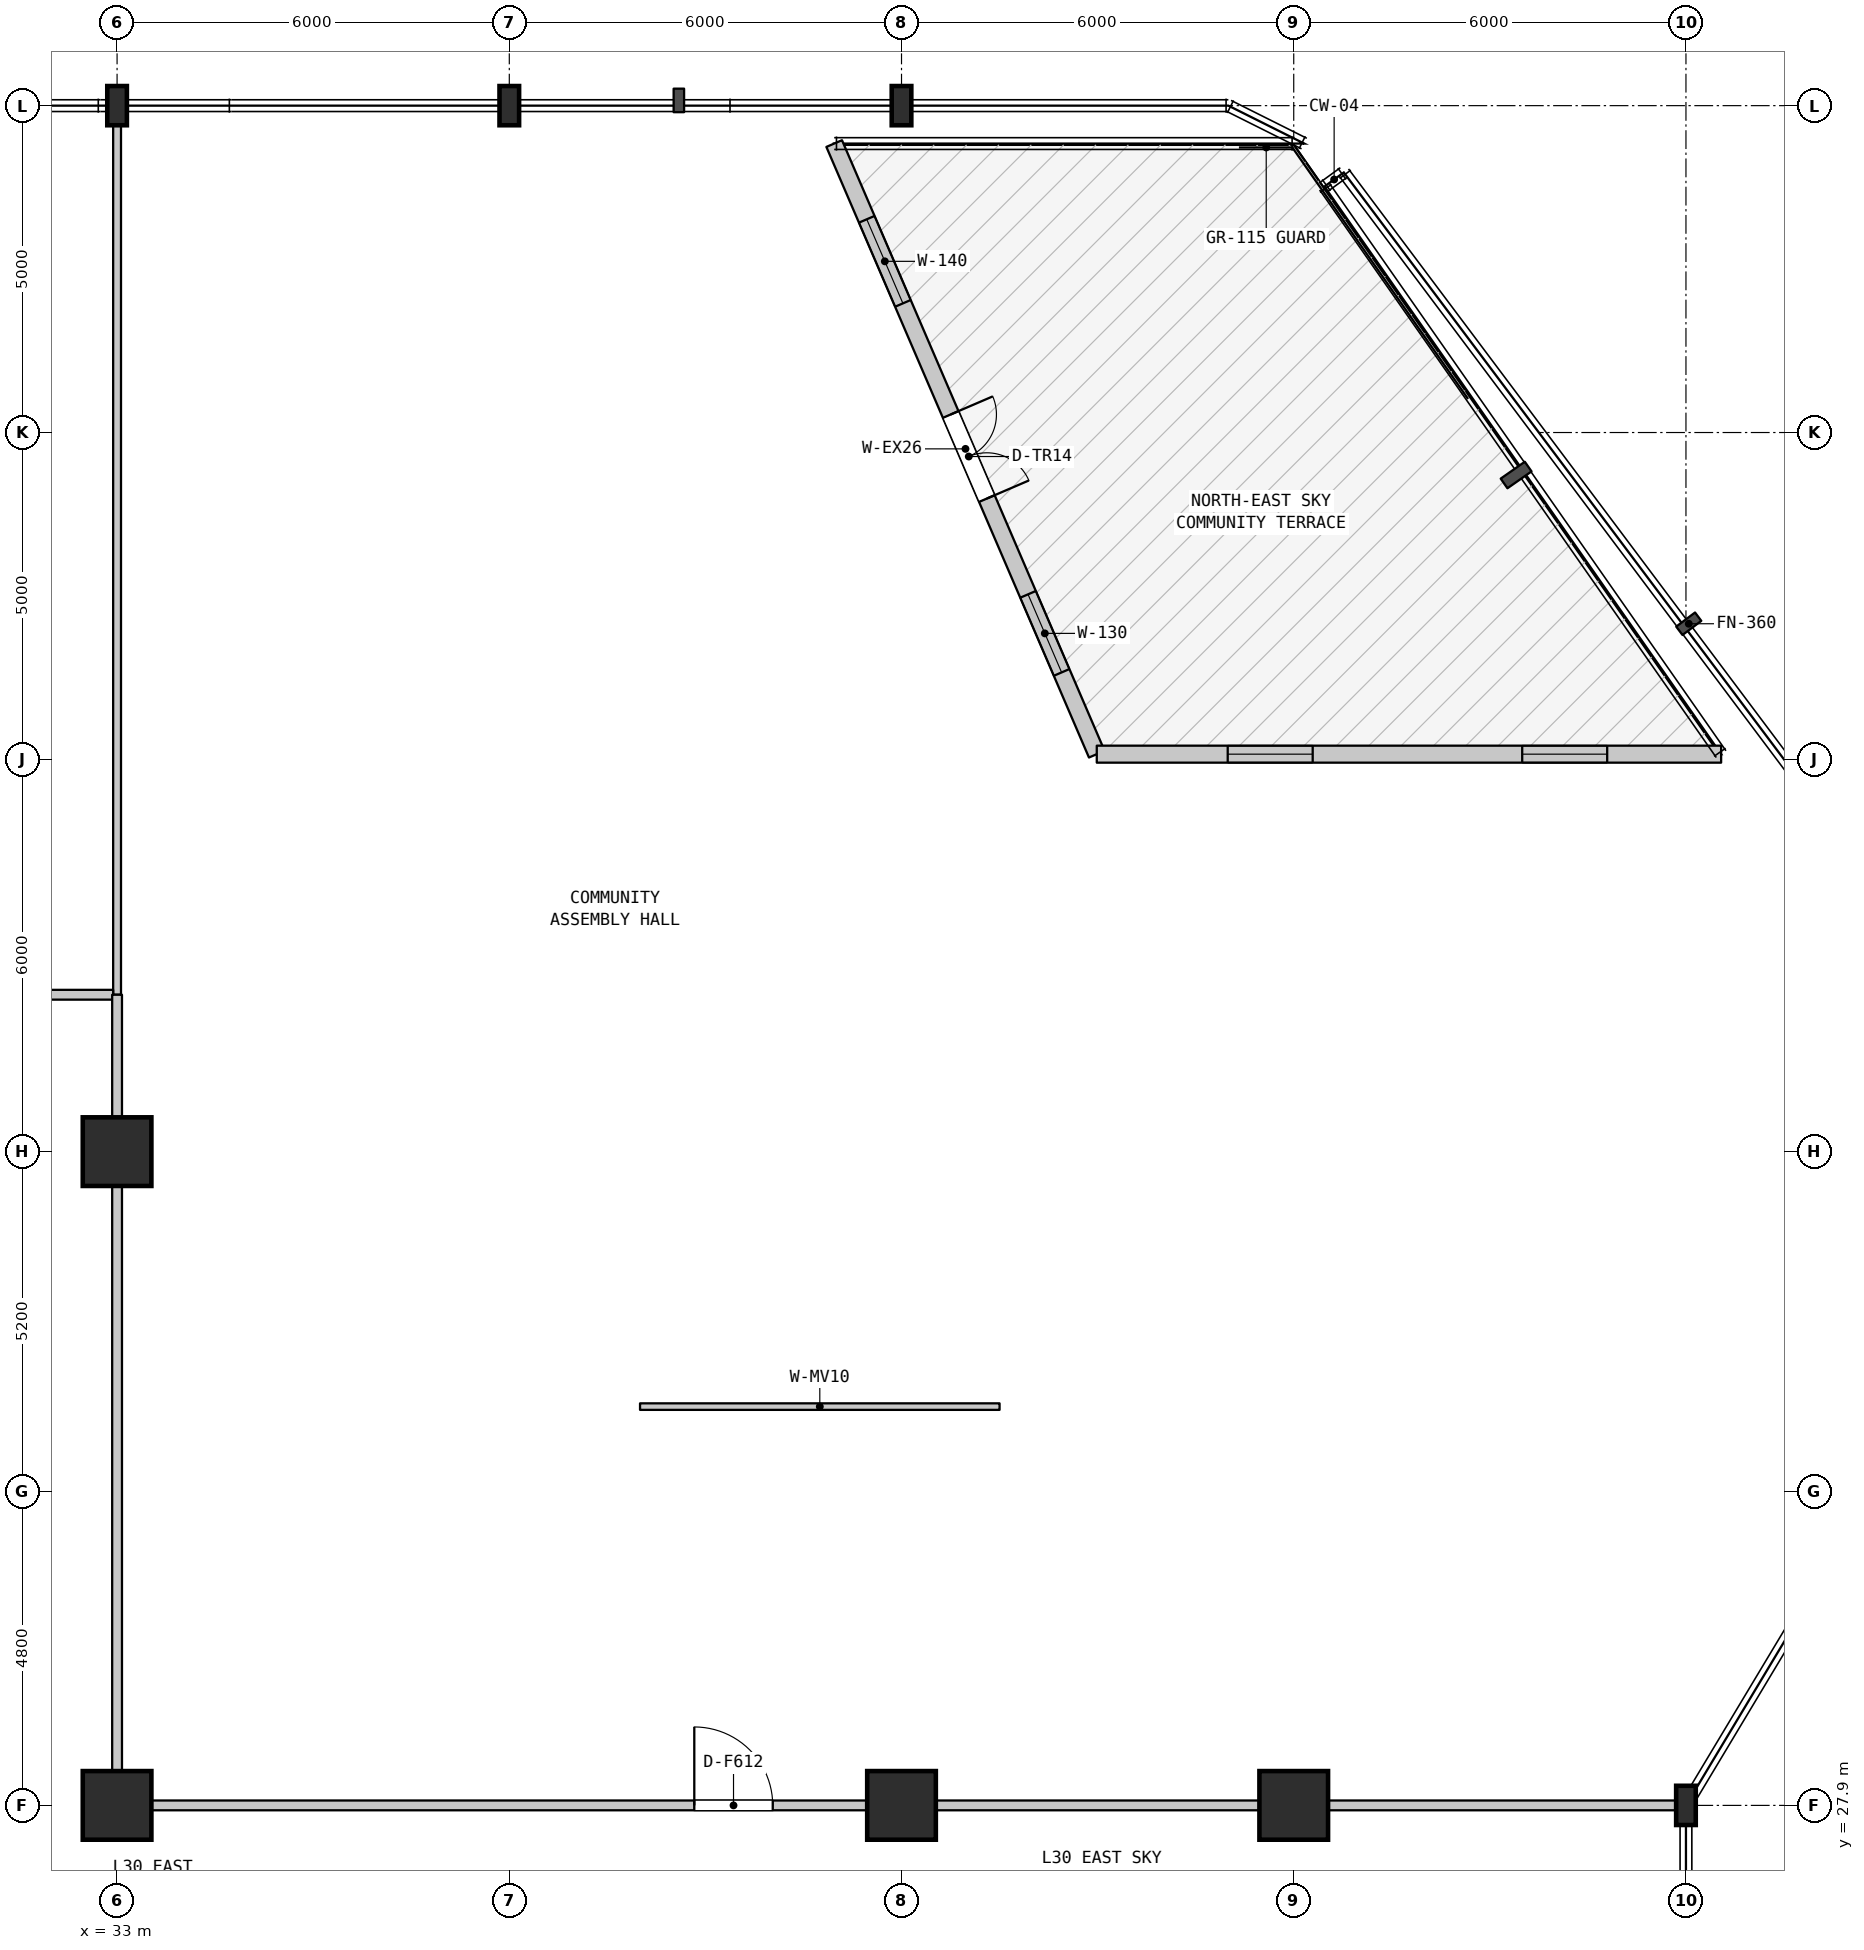
"""IFC4 building model, lengths in metres.
Left out: names, types, materials, properties, quantities, classifications, styles, units other than length and angle.
Written with IfcOpenShell. Run it as: python <this file> out.ifc"""

import sys

from ifc_helpers import new_model, si_unit, direction, frame, frame_2d, origin, origin_2d, place, context, subcontext, project, spatial, rectangle, i_section, extrude, element, fill, save


model = new_model("IFC4")
c1 = context("Model", 3, precision=1e-05, world=origin(), true_north=direction((0.0, 1.0)))
c2 = subcontext(c1, "Body", "Model", "MODEL_VIEW")
j1 = project(units=[si_unit("LENGTHUNIT", "METRE"), si_unit("PLANEANGLEUNIT", "RADIAN")], contexts=[c1])
p1 = place(None, origin())
s1 = spatial("IfcSite", under=j1, at=p1, CompositionType="ELEMENT")
p2 = place(p1, origin())
s2 = spatial("IfcBuilding", under=s1, at=p2, CompositionType="ELEMENT")
p3 = place(p2, frame((0.0, 0.0, 125.3)))
s3 = spatial("IfcBuildingStorey", under=s2, at=p3, CompositionType="ELEMENT", Elevation=125.3)
for number, where, z_axis, x_axis in (
    (1, (33.0, 27.9, 0.0), (0.0, 0.0, 1.0), (1.0, 0.0, 0.0)),
    (2, (33.0, 37.9, 0.0), (0.0, 0.0, 1.0), (1.0, 0.0, 0.0)),
):
    element("IfcColumn", number, at=place(p3, frame(where, z_axis=z_axis, x_axis=x_axis)), inside=s3, PredefinedType="COLUMN", context=c2, shape_type="SweptSolid", body=[
        extrude(rectangle(XDim=1.05, YDim=1.05, at=origin_2d()), origin(), (0.0, 0.0, 1.0), 4.5),
    ])
for number, where, z_axis, x_axis in (
    (3, (33.0, 53.9, 0.0), (0.0, 0.0, 1.0), (1.0, 0.0, 0.0)),
    (4, (39.0, 53.9, 0.0), (0.0, 0.0, 1.0), (1.0, 0.0, 0.0)),
):
    element("IfcColumn", number, at=place(p3, frame(where, z_axis=z_axis, x_axis=x_axis)), inside=s3, PredefinedType="COLUMN", context=c2, shape_type="SweptSolid", body=[
        extrude(i_section(OverallWidth=0.3, OverallDepth=0.6, WebThickness=0.015, FlangeThickness=0.03, FilletRadius=0.027, at=origin_2d()), origin(), (0.0, 0.0, 1.0), 4.5),
    ])
p4 = place(p3, frame((45.0, 27.9, 0.0), z_axis=(0.0, 0.0, 1.0), x_axis=(1.0, 0.0, 0.0)))
e5 = element("IfcColumn", 5, at=p4, inside=s3, PredefinedType="COLUMN", context=c2, shape_type="SweptSolid", body=[
    extrude(rectangle(XDim=1.05, YDim=1.05, at=origin_2d()), origin(), (0.0, 0.0, 1.0), 4.5),
])
p5 = place(p3, frame((45.0, 53.9, 0.0), z_axis=(0.0, 0.0, 1.0), x_axis=(1.0, 0.0, 0.0)))
e6 = element("IfcColumn", 6, at=p5, inside=s3, PredefinedType="COLUMN", context=c2, shape_type="SweptSolid", body=[
    extrude(i_section(OverallWidth=0.3, OverallDepth=0.6, WebThickness=0.015, FlangeThickness=0.03, FilletRadius=0.027, at=origin_2d()), origin(), (0.0, 0.0, 1.0), 4.5),
])
p6 = place(p3, frame((51.0, 27.9, 0.0), z_axis=(0.0, 0.0, 1.0), x_axis=(1.0, 0.0, 0.0)))
e7 = element("IfcColumn", 7, at=p6, inside=s3, PredefinedType="COLUMN", context=c2, shape_type="SweptSolid", body=[
    extrude(rectangle(XDim=1.05, YDim=1.05, at=origin_2d()), origin(), (0.0, 0.0, 1.0), 4.5),
])
p7 = place(p3, frame((57.0, 27.9, 0.0), z_axis=(0.0, 0.0, 1.0), x_axis=(1.0, 0.0, 0.0)))
e8 = element("IfcColumn", 8, at=p7, inside=s3, PredefinedType="COLUMN", context=c2, shape_type="SweptSolid", body=[
    extrude(i_section(OverallWidth=0.3, OverallDepth=0.6, WebThickness=0.015, FlangeThickness=0.03, FilletRadius=0.027, at=origin_2d()), origin(), (0.0, 0.0, 1.0), 4.5),
])
p8 = place(p3, frame((43.97, 53.32, 0.0), z_axis=(0.0, 0.0, 1.0), x_axis=(0.395098475243, -0.918638772783, 0.0)))
e9 = element("IfcWall", 9, at=p8, inside=s3, PredefinedType="STANDARD", context=c2, shape_type="SweptSolid", body=[
    extrude(rectangle(XDim=10.167, YDim=0.26, at=frame_2d((5.083, 0.0))), origin(), (0.0, 0.0, 1.0), 4.185),
])
p9 = place(p8, frame((4.511, 0.0, 0.0)))
e10 = element("IfcOpeningElement", 10, at=p9, cuts=e9, PredefinedType="OPENING", context=c2, shape_type="SweptSolid", body=[
    extrude(rectangle(XDim=1.4, YDim=2.2, at=frame_2d((0.7, 1.1))), frame((0.0, 0.14, 0.0), z_axis=(0.0, -1.0, 0.0), x_axis=(1.0, 0.0, 0.0)), (0.0, 0.0, 1.0), 0.28),
])
p10 = place(p8, frame((1.261, 0.0, 0.9)))
e11 = element("IfcOpeningElement", 11, at=p10, cuts=e9, PredefinedType="OPENING", context=c2, shape_type="SweptSolid", body=[
    extrude(rectangle(XDim=1.4, YDim=1.85, at=frame_2d((0.7, 0.925))), frame((0.0, 0.14, 0.0), z_axis=(0.0, -1.0, 0.0), x_axis=(1.0, 0.0, 0.0)), (0.0, 0.0, 1.0), 0.28),
])
p11 = place(p8, frame((7.506, 0.0, 0.9)))
e12 = element("IfcOpeningElement", 12, at=p11, cuts=e9, PredefinedType="OPENING", context=c2, shape_type="SweptSolid", body=[
    extrude(rectangle(XDim=1.3, YDim=1.9, at=frame_2d((0.65, 0.95))), frame((0.0, 0.14, 0.0), z_axis=(0.0, -1.0, 0.0), x_axis=(1.0, 0.0, 0.0)), (0.0, 0.0, 1.0), 0.28),
])
p12 = place(p3, frame((47.987, 43.98, 0.0), z_axis=(0.0, 0.0, 1.0), x_axis=(1.0, 0.0, 0.0)))
e13 = element("IfcWall", 13, at=p12, inside=s3, PredefinedType="STANDARD", context=c2, shape_type="SweptSolid", body=[
    extrude(rectangle(XDim=9.551, YDim=0.26, at=frame_2d((4.775, 0.0))), origin(), (0.0, 0.0, 1.0), 4.185),
])
p13 = place(p12, frame((2.003, 0.0, 0.85)))
e14 = element("IfcOpeningElement", 14, at=p13, cuts=e13, PredefinedType="OPENING", context=c2, shape_type="SweptSolid", body=[
    extrude(rectangle(XDim=1.3, YDim=1.9, at=frame_2d((0.65, 0.95))), frame((0.0, 0.14, 0.0), z_axis=(0.0, -1.0, 0.0), x_axis=(1.0, 0.0, 0.0)), (0.0, 0.0, 1.0), 0.28),
])
p14 = place(p12, frame((6.508, 0.0, 0.85)))
e15 = element("IfcOpeningElement", 15, at=p14, cuts=e13, PredefinedType="OPENING", context=c2, shape_type="SweptSolid", body=[
    extrude(rectangle(XDim=1.3, YDim=1.9, at=frame_2d((0.65, 0.95))), frame((0.0, 0.14, 0.0), z_axis=(0.0, -1.0, 0.0), x_axis=(1.0, 0.0, 0.0)), (0.0, 0.0, 1.0), 0.28),
])
p15 = place(p3, frame((33.0, 27.9, 0.0), z_axis=(0.0, 0.0, 1.0), x_axis=(0.0, 1.0, 0.0)))
e16 = element("IfcWall", 16, at=p15, inside=s3, PredefinedType="STANDARD", context=c2, shape_type="SweptSolid", body=[
    extrude(rectangle(XDim=10.0, YDim=0.15, at=frame_2d((5.0, 0.0))), origin(), (0.0, 0.0, 1.0), 3.685),
])
p16 = place(p3, frame((33.0, 40.3, 0.0), z_axis=(0.0, 0.0, 1.0), x_axis=(0.0, 1.0, 0.0)))
e17 = element("IfcWall", 17, at=p16, inside=s3, PredefinedType="PARTITIONING", context=c2, shape_type="SweptSolid", body=[
    extrude(rectangle(XDim=13.59, YDim=0.12, at=frame_2d((6.795, 0.0))), origin(), (0.0, 0.0, 1.0), 3.585),
])
p17 = place(p3, frame((33.06, 27.9, 0.0), z_axis=(0.0, 0.0, 1.0), x_axis=(1.0, 0.0, 0.0)))
e18 = element("IfcWall", 18, at=p17, inside=s3, PredefinedType="STANDARD", context=c2, shape_type="SweptSolid", body=[
    extrude(rectangle(XDim=11.94, YDim=0.15, at=frame_2d((5.97, 0.0))), origin(), (0.0, 0.0, 1.0), 3.685),
])
p18 = place(p17, frame((8.77, 0.0, 0.0)))
e19 = element("IfcOpeningElement", 19, at=p18, cuts=e18, PredefinedType="OPENING", context=c2, shape_type="SweptSolid", body=[
    extrude(rectangle(XDim=1.2, YDim=2.2, at=frame_2d((0.6, 1.1))), frame((0.0, 0.085, 0.0), z_axis=(0.0, -1.0, 0.0), x_axis=(1.0, 0.0, 0.0)), (0.0, 0.0, 1.0), 0.17),
])
p19 = place(p3, frame((15.045, 40.3, 0.0), z_axis=(0.0, 0.0, 1.0), x_axis=(1.0, 0.0, 0.0)))
e20 = element("IfcWall", 20, at=p19, inside=s3, PredefinedType="STANDARD", context=c2, shape_type="SweptSolid", body=[
    extrude(rectangle(XDim=17.895, YDim=0.15, at=frame_2d((8.948, 0.0))), origin(), (0.0, 0.0, 1.0), 4.185),
])
p20 = place(p19, frame((9.205, 0.0, 0.0)))
e21 = element("IfcOpeningElement", 21, at=p20, cuts=e20, PredefinedType="OPENING", context=c2, shape_type="SweptSolid", body=[
    extrude(rectangle(XDim=1.0, YDim=2.15, at=frame_2d((0.5, 1.075))), frame((0.0, 0.085, 0.0), z_axis=(0.0, -1.0, 0.0), x_axis=(1.0, 0.0, 0.0)), (0.0, 0.0, 1.0), 0.17),
])
p21 = place(p3, frame((41.0, 34.0, 0.0), z_axis=(0.0, 0.0, 1.0), x_axis=(1.0, 0.0, 0.0)))
e22 = element("IfcWall", 22, at=p21, inside=s3, PredefinedType="MOVABLE", context=c2, shape_type="SweptSolid", body=[
    extrude(rectangle(XDim=5.5, YDim=0.1, at=frame_2d((2.75, 0.0))), origin(), (0.0, 0.0, 1.0), 4.135),
])
p22 = place(p3, frame((33.0, 37.9, 0.0), z_axis=(0.0, 0.0, 1.0), x_axis=(0.0, 1.0, 0.0)))
e23 = element("IfcWall", 23, at=p22, inside=s3, PredefinedType="STANDARD", context=c2, shape_type="SweptSolid", body=[
    extrude(rectangle(XDim=2.4, YDim=0.15, at=frame_2d((1.2, 0.0))), origin(), (0.0, 0.0, 1.0), 3.585),
])
p23 = place(p3, frame((45.0, 27.9, 0.0), z_axis=(0.0, 0.0, 1.0), x_axis=(1.0, 0.0, 0.0)))
e24 = element("IfcWall", 24, at=p23, inside=s3, PredefinedType="STANDARD", context=c2, shape_type="SweptSolid", body=[
    extrude(rectangle(XDim=11.99, YDim=0.15, at=frame_2d((5.995, 0.0))), origin(), (0.0, 0.0, 1.0), 3.735),
])
p24 = place(p9, origin())
e25 = element("IfcDoor", 25, at=p24, inside=s3, OperationType="DOUBLE_DOOR_SINGLE_SWING", PredefinedType="DOOR", context=c2, shape_type="SweptSolid", body=[
    extrude(rectangle(XDim=1.4, YDim=2.2, at=frame_2d((0.7, 1.1))), frame((0.0, 0.025, 0.0), z_axis=(0.0, -1.0, 0.0), x_axis=(1.0, 0.0, 0.0)), (0.0, 0.0, 1.0), 0.05),
])
fill(e10, e25)
p25 = place(p10, origin())
e26 = element("IfcWindow", 26, at=p25, inside=s3, PartitioningType="SINGLE_PANEL", PredefinedType="WINDOW", context=c2, shape_type="SweptSolid", body=[
    extrude(rectangle(XDim=1.4, YDim=1.85, at=frame_2d((0.7, 0.925))), frame((0.0, 0.03, 0.0), z_axis=(0.0, -1.0, 0.0), x_axis=(1.0, 0.0, 0.0)), (0.0, 0.0, 1.0), 0.06),
])
fill(e11, e26)
p26 = place(p11, origin())
e27 = element("IfcWindow", 27, at=p26, inside=s3, PartitioningType="SINGLE_PANEL", PredefinedType="WINDOW", context=c2, shape_type="SweptSolid", body=[
    extrude(rectangle(XDim=1.3, YDim=1.9, at=frame_2d((0.65, 0.95))), frame((0.0, 0.03, 0.0), z_axis=(0.0, -1.0, 0.0), x_axis=(1.0, 0.0, 0.0)), (0.0, 0.0, 1.0), 0.06),
])
fill(e12, e27)
p27 = place(p13, origin())
e28 = element("IfcWindow", 28, at=p27, inside=s3, PartitioningType="SINGLE_PANEL", PredefinedType="WINDOW", context=c2, shape_type="SweptSolid", body=[
    extrude(rectangle(XDim=1.3, YDim=1.9, at=frame_2d((0.65, 0.95))), frame((0.0, 0.03, 0.0), z_axis=(0.0, -1.0, 0.0), x_axis=(1.0, 0.0, 0.0)), (0.0, 0.0, 1.0), 0.06),
])
fill(e14, e28)
p28 = place(p14, origin())
e29 = element("IfcWindow", 29, at=p28, inside=s3, PartitioningType="SINGLE_PANEL", PredefinedType="WINDOW", context=c2, shape_type="SweptSolid", body=[
    extrude(rectangle(XDim=1.3, YDim=1.9, at=frame_2d((0.65, 0.95))), frame((0.0, 0.03, 0.0), z_axis=(0.0, -1.0, 0.0), x_axis=(1.0, 0.0, 0.0)), (0.0, 0.0, 1.0), 0.06),
])
fill(e15, e29)
p29 = place(p18, origin())
e30 = element("IfcDoor", 30, at=p29, inside=s3, OperationType="SINGLE_SWING_LEFT", PredefinedType="DOOR", context=c2, shape_type="SweptSolid", body=[
    extrude(rectangle(XDim=1.2, YDim=2.2, at=frame_2d((0.6, 1.1))), frame((0.0, 0.025, 0.0), z_axis=(0.0, -1.0, 0.0), x_axis=(1.0, 0.0, 0.0)), (0.0, 0.0, 1.0), 0.05),
])
fill(e19, e30)
save(model, sys.argv[1])
